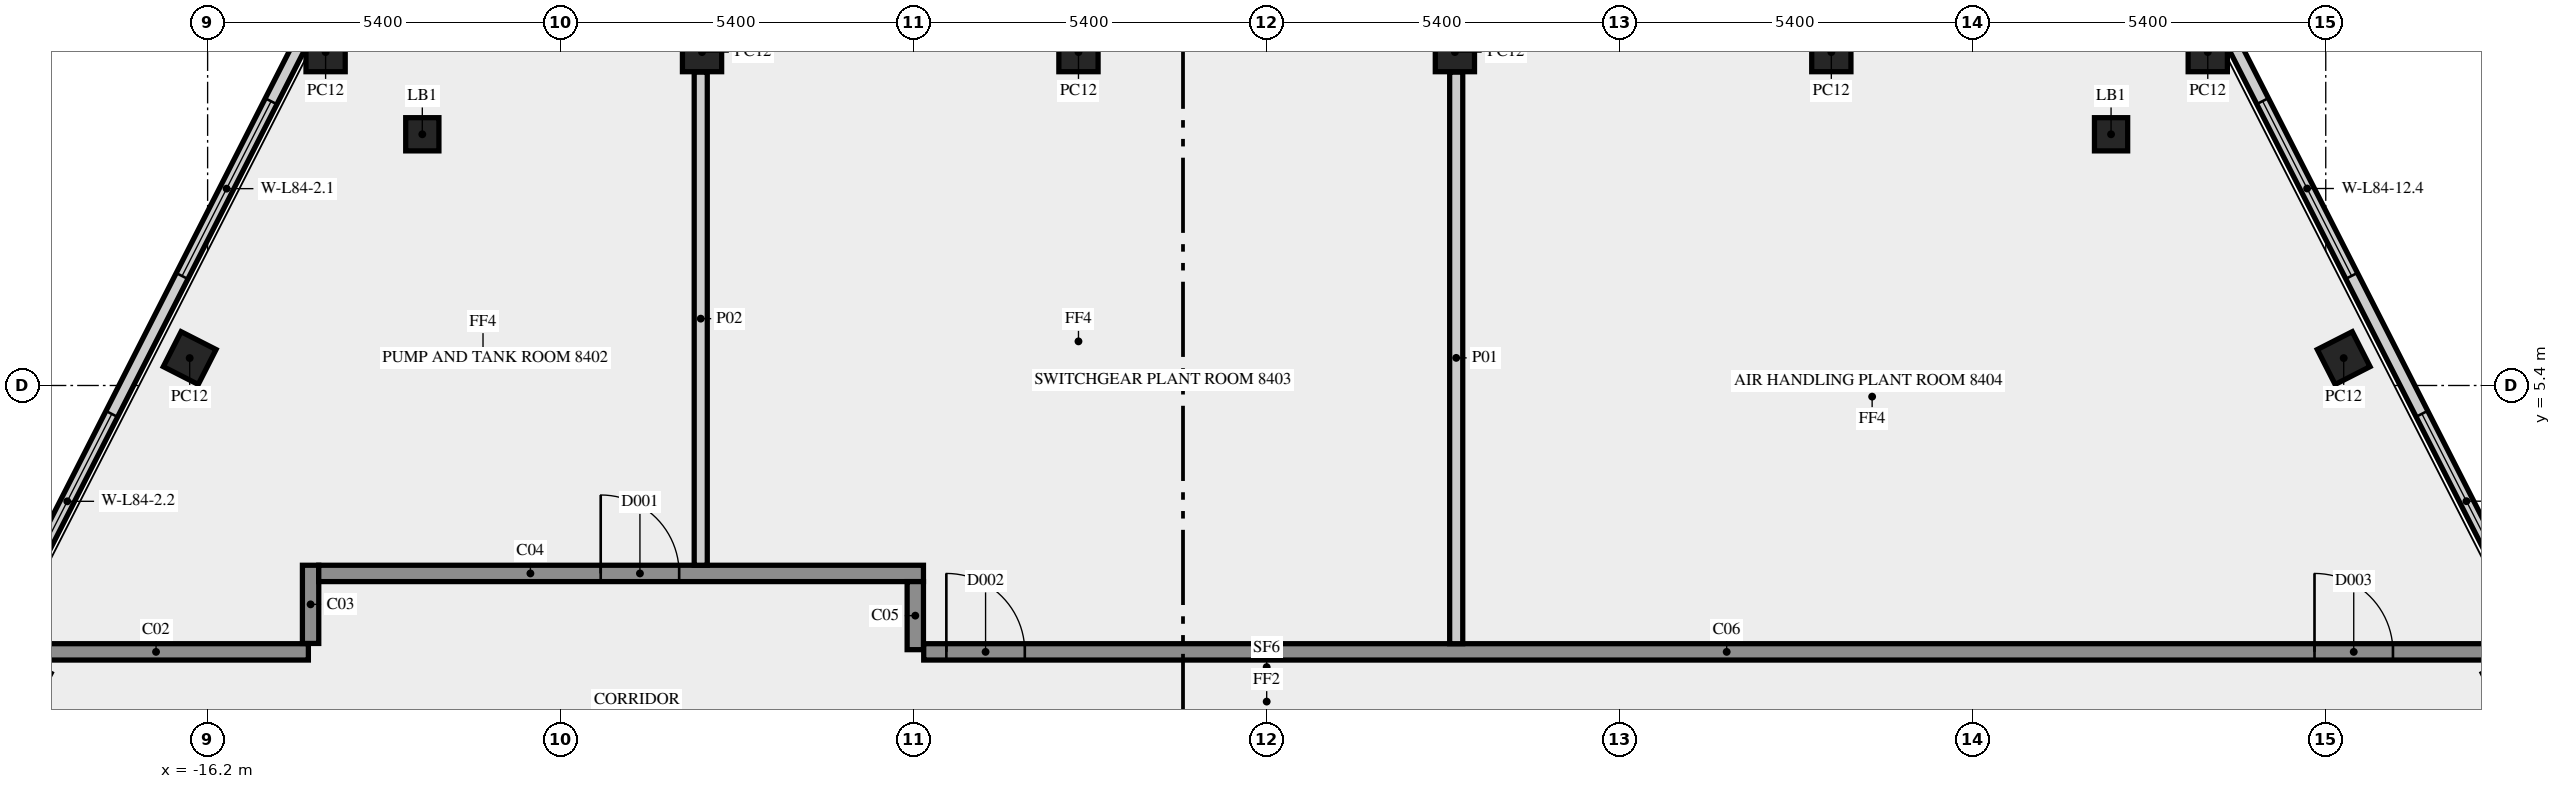
"""IFC4 building model, lengths in metres.
Left out: names, types, materials, properties, quantities, classifications, styles, units other than length and angle.
Written with IfcOpenShell. Run it as: python <this file> out.ifc"""

import sys

from ifc_helpers import new_model, si_unit, direction, frame, frame_2d, origin, origin_2d, place, context, subcontext, project, spatial, rectangle, hollow_rectangle, extrude, element, fill, save


model = new_model("IFC4")
c1 = context("Model", 3, precision=1e-05, world=origin(), true_north=direction((0.0, 1.0)))
c2 = subcontext(c1, "Body", "Model", "MODEL_VIEW")
j1 = project(units=[si_unit("LENGTHUNIT", "METRE"), si_unit("PLANEANGLEUNIT", "RADIAN")], contexts=[c1])
p1 = place(None, origin())
s1 = spatial("IfcSite", under=j1, at=p1, CompositionType="ELEMENT")
p2 = place(p1, origin())
s2 = spatial("IfcBuilding", under=s1, at=p2, CompositionType="ELEMENT")
p3 = place(p2, frame((0.0, 0.0, 363.0)))
s3 = spatial("IfcBuildingStorey", under=s2, at=p3, CompositionType="ELEMENT", Elevation=363.0)
for number, where, z_axis, x_axis in (
    (1, (-16.474, 5.819, 0.0), (0.0, 0.0, 1.0), (-0.454, -0.891, 0.0)),
    (2, (16.474, 5.819, 0.0), (0.0, 0.0, 1.0), (-0.454, 0.891, 0.0)),
    (3, (14.395, 10.5, 0.0), (0.0, 0.0, 1.0), (-1.0, 0.0, 0.0)),
    (4, (8.637, 10.5, 0.0), (0.0, 0.0, 1.0), (-1.0, 0.0, 0.0)),
    (5, (2.879, 10.5, 0.0), (0.0, 0.0, 1.0), (-1.0, 0.0, 0.0)),
    (6, (-2.879, 10.5, 0.0), (0.0, 0.0, 1.0), (-1.0, 0.0, 0.0)),
    (7, (-8.637, 10.5, 0.0), (0.0, 0.0, 1.0), (-1.0, 0.0, 0.0)),
    (8, (-14.395, 10.5, 0.0), (0.0, 0.0, 1.0), (-1.0, 0.0, 0.0)),
):
    element("IfcColumn", number, at=place(p3, frame(where, z_axis=z_axis, x_axis=x_axis)), inside=s3, PredefinedType="COLUMN", context=c2, shape_type="SweptSolid", body=[
        extrude(rectangle(XDim=0.6, YDim=0.6, at=origin_2d()), origin(), (0.0, 0.0, 1.0), 4.75),
    ])
for number, where, z_axis, x_axis in (
    (9, (12.916, 9.243, 0.0), (0.0, 0.0, 1.0), (1.0, 0.0, 0.0)),
    (10, (-12.916, 9.243, 0.0), (0.0, 0.0, 1.0), (1.0, 0.0, 0.0)),
):
    element("IfcColumn", number, at=place(p3, frame(where, z_axis=z_axis, x_axis=x_axis)), inside=s3, PredefinedType="COLUMN", context=c2, shape_type="SweptSolid", body=[
        extrude(hollow_rectangle(XDim=0.508, YDim=0.508, WallThickness=0.016, at=origin_2d()), origin(), (0.0, 0.0, 1.0), 4.75),
    ])
p4 = place(p3, frame((-14.748, 10.692, 0.0), z_axis=(0.0, 0.0, 1.0), x_axis=(-0.453989383659, -0.891007092859, 0.0)))
e11 = element("IfcWall", 11, at=p4, inside=s3, PredefinedType="SOLIDWALL", context=c2, shape_type="SweptSolid", body=[
    extrude(rectangle(XDim=20.988, YDim=0.2, at=frame_2d((10.494, 0.0))), origin(), (0.0, 0.0, 1.0), 4.75),
])
p5 = place(p4, frame((1.06, 0.0, 1.0)))
e12 = element("IfcOpeningElement", 12, at=p5, cuts=e11, PredefinedType="OPENING", context=c2, shape_type="SweptSolid", body=[
    extrude(rectangle(XDim=3.0, YDim=2.8, at=frame_2d((1.5, 1.4))), frame((0.0, 0.11, 0.0), z_axis=(0.0, -1.0, 0.0), x_axis=(1.0, 0.0, 0.0)), (0.0, 0.0, 1.0), 0.22),
])
p6 = place(p4, frame((6.428, 0.0, 1.0)))
e13 = element("IfcOpeningElement", 13, at=p6, cuts=e11, PredefinedType="OPENING", context=c2, shape_type="SweptSolid", body=[
    extrude(rectangle(XDim=3.0, YDim=2.8, at=frame_2d((1.5, 1.4))), frame((0.0, 0.11, 0.0), z_axis=(0.0, -1.0, 0.0), x_axis=(1.0, 0.0, 0.0)), (0.0, 0.0, 1.0), 0.22),
])
p7 = place(p4, frame((12.044, 0.0, 1.0)))
e14 = element("IfcOpeningElement", 14, at=p7, cuts=e11, PredefinedType="OPENING", context=c2, shape_type="SweptSolid", body=[
    extrude(rectangle(XDim=3.0, YDim=2.8, at=frame_2d((1.5, 1.4))), frame((0.0, 0.11, 0.0), z_axis=(0.0, -1.0, 0.0), x_axis=(1.0, 0.0, 0.0)), (0.0, 0.0, 1.0), 0.22),
])
p8 = place(p4, frame((17.17, 0.0, 1.0)))
e15 = element("IfcOpeningElement", 15, at=p8, cuts=e11, PredefinedType="OPENING", context=c2, shape_type="SweptSolid", body=[
    extrude(rectangle(XDim=3.0, YDim=2.8, at=frame_2d((1.5, 1.4))), frame((0.0, 0.11, 0.0), z_axis=(0.0, -1.0, 0.0), x_axis=(1.0, 0.0, 0.0)), (0.0, 0.0, 1.0), 0.22),
])
p9 = place(p3, frame((24.274, -7.992, 0.0), z_axis=(0.0, 0.0, 1.0), x_axis=(-0.453998845176, 0.891002271927, 0.0)))
e16 = element("IfcWall", 16, at=p9, inside=s3, PredefinedType="SOLIDWALL", context=c2, shape_type="SweptSolid", body=[
    extrude(rectangle(XDim=20.973, YDim=0.2, at=frame_2d((10.487, 0.0))), origin(), (0.0, 0.0, 1.0), 4.75),
])
p10 = place(p9, frame((0.81, 0.0, 1.0)))
e17 = element("IfcOpeningElement", 17, at=p10, cuts=e16, PredefinedType="OPENING", context=c2, shape_type="SweptSolid", body=[
    extrude(rectangle(XDim=3.0, YDim=2.8, at=frame_2d((1.5, 1.4))), frame((0.0, 0.11, 0.0), z_axis=(0.0, -1.0, 0.0), x_axis=(1.0, 0.0, 0.0)), (0.0, 0.0, 1.0), 0.22),
])
p11 = place(p9, frame((5.928, 0.0, 1.0)))
e18 = element("IfcOpeningElement", 18, at=p11, cuts=e16, PredefinedType="OPENING", context=c2, shape_type="SweptSolid", body=[
    extrude(rectangle(XDim=3.0, YDim=2.8, at=frame_2d((1.5, 1.4))), frame((0.0, 0.11, 0.0), z_axis=(0.0, -1.0, 0.0), x_axis=(1.0, 0.0, 0.0)), (0.0, 0.0, 1.0), 0.22),
])
p12 = place(p9, frame((11.544, 0.0, 1.0)))
e19 = element("IfcOpeningElement", 19, at=p12, cuts=e16, PredefinedType="OPENING", context=c2, shape_type="SweptSolid", body=[
    extrude(rectangle(XDim=3.0, YDim=2.8, at=frame_2d((1.5, 1.4))), frame((0.0, 0.11, 0.0), z_axis=(0.0, -1.0, 0.0), x_axis=(1.0, 0.0, 0.0)), (0.0, 0.0, 1.0), 0.22),
])
p13 = place(p9, frame((16.913, 0.0, 1.0)))
e20 = element("IfcOpeningElement", 20, at=p13, cuts=e16, PredefinedType="OPENING", context=c2, shape_type="SweptSolid", body=[
    extrude(rectangle(XDim=3.0, YDim=2.8, at=frame_2d((1.5, 1.4))), frame((0.0, 0.11, 0.0), z_axis=(0.0, -1.0, 0.0), x_axis=(1.0, 0.0, 0.0)), (0.0, 0.0, 1.0), 0.22),
])
p14 = place(p3, frame((-19.319, 1.325, 0.0), z_axis=(0.0, 0.0, 1.0), x_axis=(1.0, 0.0, 0.0)))
e21 = element("IfcWall", 21, at=p14, inside=s3, PredefinedType="SOLIDWALL", context=c2, shape_type="SweptSolid", body=[
    extrude(rectangle(XDim=4.66, YDim=0.25, at=frame_2d((2.33, 0.0))), origin(), (0.0, 0.0, 1.0), 4.75),
])
p15 = place(p3, frame((-14.625, 1.454, 0.0), z_axis=(0.0, 0.0, 1.0), x_axis=(0.0, 1.0, 0.0)))
e22 = element("IfcWall", 22, at=p15, inside=s3, PredefinedType="SOLIDWALL", context=c2, shape_type="SweptSolid", body=[
    extrude(rectangle(XDim=1.196, YDim=0.25, at=frame_2d((0.598, 0.0))), origin(), (0.0, 0.0, 1.0), 4.75),
])
p16 = place(p3, frame((-14.5, 2.525, 0.0), z_axis=(0.0, 0.0, 1.0), x_axis=(1.0, 0.0, 0.0)))
e23 = element("IfcWall", 23, at=p16, inside=s3, PredefinedType="SOLIDWALL", context=c2, shape_type="SweptSolid", body=[
    extrude(rectangle(XDim=9.25, YDim=0.25, at=frame_2d((4.625, 0.0))), origin(), (0.0, 0.0, 1.0), 4.75),
])
p17 = place(p16, frame((4.313, 0.0, 0.0)))
e24 = element("IfcOpeningElement", 24, at=p17, cuts=e23, PredefinedType="OPENING", context=c2, shape_type="SweptSolid", body=[
    extrude(rectangle(XDim=1.2, YDim=2.1, at=frame_2d((0.6, 1.05))), frame((0.0, 0.135, 0.0), z_axis=(0.0, -1.0, 0.0), x_axis=(1.0, 0.0, 0.0)), (0.0, 0.0, 1.0), 0.27),
])
p18 = place(p3, frame((-5.375, 2.4, 0.0), z_axis=(0.0, 0.0, 1.0), x_axis=(0.0, -1.0, 0.0)))
e25 = element("IfcWall", 25, at=p18, inside=s3, PredefinedType="SOLIDWALL", context=c2, shape_type="SweptSolid", body=[
    extrude(rectangle(XDim=1.041, YDim=0.25, at=frame_2d((0.521, 0.0))), origin(), (0.0, 0.0, 1.0), 4.75),
])
p19 = place(p3, frame((-5.246, 1.325, 0.0), z_axis=(0.0, 0.0, 1.0), x_axis=(1.0, 0.0, 0.0)))
e26 = element("IfcWall", 26, at=p19, inside=s3, PredefinedType="SOLIDWALL", context=c2, shape_type="SweptSolid", body=[
    extrude(rectangle(XDim=24.565, YDim=0.25, at=frame_2d((12.283, 0.0))), origin(), (0.0, 0.0, 1.0), 4.75),
])
p20 = place(p19, frame((21.274, 0.0, 0.0)))
e27 = element("IfcOpeningElement", 27, at=p20, cuts=e26, PredefinedType="OPENING", context=c2, shape_type="SweptSolid", body=[
    extrude(rectangle(XDim=1.2, YDim=2.1, at=frame_2d((0.6, 1.05))), frame((0.0, 0.135, 0.0), z_axis=(0.0, -1.0, 0.0), x_axis=(1.0, 0.0, 0.0)), (0.0, 0.0, 1.0), 0.27),
])
p21 = place(p19, frame((0.346, 0.0, 0.0)))
e28 = element("IfcOpeningElement", 28, at=p21, cuts=e26, PredefinedType="OPENING", context=c2, shape_type="SweptSolid", body=[
    extrude(rectangle(XDim=1.2, YDim=2.1, at=frame_2d((0.6, 1.05))), frame((0.0, 0.135, 0.0), z_axis=(0.0, -1.0, 0.0), x_axis=(1.0, 0.0, 0.0)), (0.0, 0.0, 1.0), 0.27),
])
p22 = place(p3, frame((2.899, 10.195, 0.0), z_axis=(0.0, 0.0, 1.0), x_axis=(0.0, -1.0, 0.0)))
e29 = element("IfcWall", 29, at=p22, inside=s3, PredefinedType="SOLIDWALL", context=c2, shape_type="SweptSolid", body=[
    extrude(rectangle(XDim=8.745, YDim=0.2, at=frame_2d((4.373, 0.0))), origin(), (0.0, 0.0, 1.0), 4.75),
])
p23 = place(p3, frame((-8.657, 2.65, 0.0), z_axis=(0.0, 0.0, 1.0), x_axis=(0.0, 1.0, 0.0)))
e30 = element("IfcWall", 30, at=p23, inside=s3, PredefinedType="SOLIDWALL", context=c2, shape_type="SweptSolid", body=[
    extrude(rectangle(XDim=7.545, YDim=0.2, at=frame_2d((3.772, 0.0))), origin(), (0.0, 0.0, 1.0), 4.75),
])
p24 = place(p5, origin())
e31 = element("IfcWindow", 31, at=p24, inside=s3, PartitioningType="SINGLE_PANEL", PredefinedType="WINDOW", context=c2, shape_type="SweptSolid", body=[
    extrude(rectangle(XDim=3.0, YDim=2.8, at=frame_2d((1.5, 1.4))), frame((0.0, 0.03, 0.0), z_axis=(0.0, -1.0, 0.0), x_axis=(1.0, 0.0, 0.0)), (0.0, 0.0, 1.0), 0.06),
])
fill(e12, e31)
p25 = place(p6, origin())
e32 = element("IfcWindow", 32, at=p25, inside=s3, PartitioningType="SINGLE_PANEL", PredefinedType="WINDOW", context=c2, shape_type="SweptSolid", body=[
    extrude(rectangle(XDim=3.0, YDim=2.8, at=frame_2d((1.5, 1.4))), frame((0.0, 0.03, 0.0), z_axis=(0.0, -1.0, 0.0), x_axis=(1.0, 0.0, 0.0)), (0.0, 0.0, 1.0), 0.06),
])
fill(e13, e32)
p26 = place(p12, origin())
e33 = element("IfcWindow", 33, at=p26, inside=s3, PartitioningType="SINGLE_PANEL", PredefinedType="WINDOW", context=c2, shape_type="SweptSolid", body=[
    extrude(rectangle(XDim=3.0, YDim=2.8, at=frame_2d((1.5, 1.4))), frame((0.0, 0.03, 0.0), z_axis=(0.0, -1.0, 0.0), x_axis=(1.0, 0.0, 0.0)), (0.0, 0.0, 1.0), 0.06),
])
fill(e19, e33)
p27 = place(p13, origin())
e34 = element("IfcWindow", 34, at=p27, inside=s3, PartitioningType="SINGLE_PANEL", PredefinedType="WINDOW", context=c2, shape_type="SweptSolid", body=[
    extrude(rectangle(XDim=3.0, YDim=2.8, at=frame_2d((1.5, 1.4))), frame((0.0, 0.03, 0.0), z_axis=(0.0, -1.0, 0.0), x_axis=(1.0, 0.0, 0.0)), (0.0, 0.0, 1.0), 0.06),
])
fill(e20, e34)
p28 = place(p20, origin())
e35 = element("IfcDoor", 35, at=p28, inside=s3, OperationType="SINGLE_SWING_RIGHT", PredefinedType="DOOR", context=c2, shape_type="SweptSolid", body=[
    extrude(rectangle(XDim=1.2, YDim=2.1, at=frame_2d((0.6, 1.05))), frame((0.0, 0.025, 0.0), z_axis=(0.0, -1.0, 0.0), x_axis=(1.0, 0.0, 0.0)), (0.0, 0.0, 1.0), 0.05),
])
fill(e27, e35)
p29 = place(p17, origin())
e36 = element("IfcDoor", 36, at=p29, inside=s3, OperationType="SINGLE_SWING_RIGHT", PredefinedType="DOOR", context=c2, shape_type="SweptSolid", body=[
    extrude(rectangle(XDim=1.2, YDim=2.1, at=frame_2d((0.6, 1.05))), frame((0.0, 0.025, 0.0), z_axis=(0.0, -1.0, 0.0), x_axis=(1.0, 0.0, 0.0)), (0.0, 0.0, 1.0), 0.05),
])
fill(e24, e36)
p30 = place(p21, origin())
e37 = element("IfcDoor", 37, at=p30, inside=s3, OperationType="SINGLE_SWING_LEFT", PredefinedType="DOOR", context=c2, shape_type="SweptSolid", body=[
    extrude(rectangle(XDim=1.2, YDim=2.1, at=frame_2d((0.6, 1.05))), frame((0.0, 0.025, 0.0), z_axis=(0.0, -1.0, 0.0), x_axis=(1.0, 0.0, 0.0)), (0.0, 0.0, 1.0), 0.05),
])
fill(e28, e37)
save(model, sys.argv[1])
